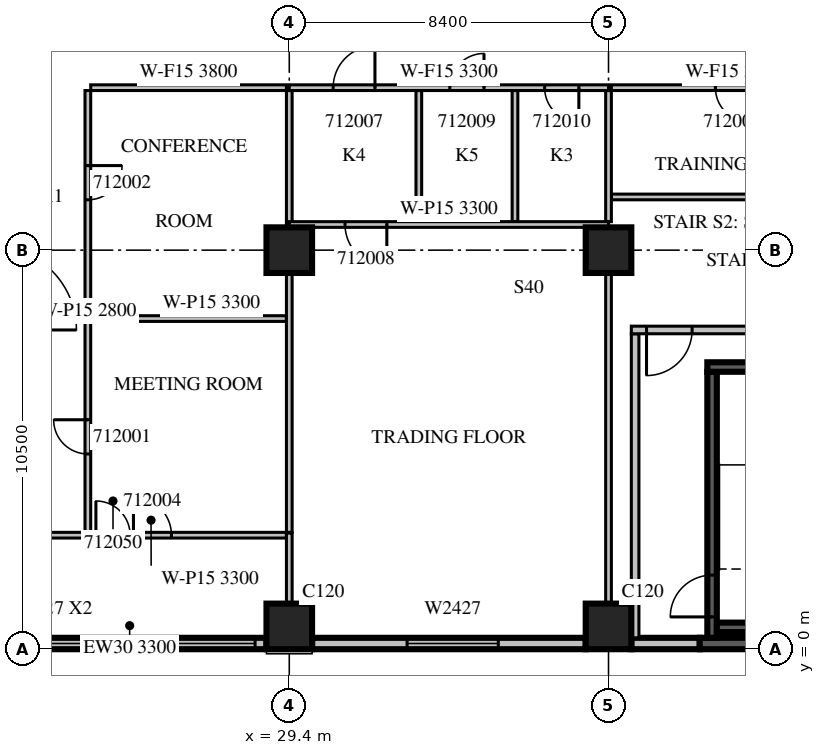
"""IFC4 building model, lengths in metres.
Left out: names, types, materials, properties, quantities, classifications, styles, units other than length and angle.
Written with IfcOpenShell. Run it as: python <this file> out.ifc"""

import sys

from ifc_helpers import new_model, si_unit, direction, frame, frame_2d, origin, origin_2d, place, context, subcontext, project, spatial, rectangle, extrude, source, transform, mapped, element, fill, save


model = new_model("IFC4")
c1 = context("Model", 3, precision=1e-05, world=origin(), true_north=direction((0.0, 1.0)))
c2 = subcontext(c1, "Body", "Model", "MODEL_VIEW")
j1 = project(units=[si_unit("LENGTHUNIT", "METRE"), si_unit("PLANEANGLEUNIT", "RADIAN")], contexts=[c1])
p1 = place(None, origin())
s1 = spatial("IfcSite", under=j1, at=p1, CompositionType="ELEMENT")
p2 = place(p1, origin())
s2 = spatial("IfcBuilding", under=s1, at=p2, CompositionType="ELEMENT")
p3 = place(p2, frame((0.0, 0.0, 61.5)))
s3 = spatial("IfcBuildingStorey", under=s2, at=p3, CompositionType="ELEMENT", Elevation=61.5)
m1 = source(origin(), c2, "Body", "SweptSolid", [
    extrude(rectangle(XDim=1.2, YDim=1.2, at=origin_2d()), origin(), (0.0, 0.0, 1.0), 4.2),
])
for number, where, z_axis, x_axis in (
    (1, (29.4, 0.6, 0.0), (0.0, 0.0, 1.0), (1.0, 0.0, 0.0)),
    (2, (37.8, 0.6, 0.0), (0.0, 0.0, 1.0), (1.0, 0.0, 0.0)),
    (3, (29.4, 10.5, 0.0), (0.0, 0.0, 1.0), (1.0, 0.0, 0.0)),
    (4, (37.8, 10.5, 0.0), (0.0, 0.0, 1.0), (1.0, 0.0, 0.0)),
):
    element("IfcColumn", number, at=place(p3, frame(where, z_axis=z_axis, x_axis=x_axis)), inside=s3, PredefinedType="COLUMN", context=c2, shape_type="MappedRepresentation", body=[
        mapped(m1, transform((0.0, 0.0, 0.0), scale=1.0)),
    ])
m2 = source(origin(), c2, "Body", "SweptSolid", [
    extrude(rectangle(XDim=7.2, YDim=0.3, at=frame_2d((3.6, 0.0))), origin(), (0.0, 0.0, 1.0), 3.3),
])
p4 = place(p3, frame((21.6, 0.15, 0.0), z_axis=(0.0, 0.0, 1.0), x_axis=(1.0, 0.0, 0.0)))
e5 = element("IfcWall", 5, at=p4, inside=s3, PredefinedType="STANDARD", context=c2, shape_type="MappedRepresentation", body=[
    mapped(m2, transform((0.0, 0.0, 0.0), scale=1.0)),
])
m3 = source(origin(), c2, "Body", "SweptSolid", [
    extrude(rectangle(XDim=2.4, YDim=2.7, at=frame_2d((1.2, 1.35))), frame((0.0, 0.16, 0.0), z_axis=(0.0, -1.0, 0.0), x_axis=(1.0, 0.0, 0.0)), (0.0, 0.0, 1.0), 0.32),
])
p5 = place(p4, frame((0.3, 0.0, 0.6)))
e6 = element("IfcOpeningElement", 6, at=p5, cuts=e5, PredefinedType="OPENING", context=c2, shape_type="MappedRepresentation", body=[
    mapped(m3, transform((0.0, 0.0, 0.0), scale=1.0)),
])
p6 = place(p4, frame((4.5, 0.0, 0.6)))
e7 = element("IfcOpeningElement", 7, at=p6, cuts=e5, PredefinedType="OPENING", context=c2, shape_type="MappedRepresentation", body=[
    mapped(m3, transform((0.0, 0.0, 0.0), scale=1.0)),
])
m4 = source(origin(), c2, "Body", "SweptSolid", [
    extrude(rectangle(XDim=7.2, YDim=0.3, at=frame_2d((3.6, 0.0))), origin(), (0.0, 0.0, 1.0), 3.8),
])
p7 = place(p3, frame((30.0, 0.15, 0.0), z_axis=(0.0, 0.0, 1.0), x_axis=(1.0, 0.0, 0.0)))
e8 = element("IfcWall", 8, at=p7, inside=s3, PredefinedType="STANDARD", context=c2, shape_type="MappedRepresentation", body=[
    mapped(m4, transform((0.0, 0.0, 0.0), scale=1.0)),
])
p8 = place(p7, frame((2.5, 0.0, 0.6)))
e9 = element("IfcOpeningElement", 9, at=p8, cuts=e8, PredefinedType="OPENING", context=c2, shape_type="MappedRepresentation", body=[
    mapped(m3, transform((0.0, 0.0, 0.0), scale=1.0)),
])
m5 = source(origin(), c2, "Body", "SweptSolid", [
    extrude(rectangle(XDim=1.8, YDim=0.3, at=frame_2d((0.9, 0.0))), origin(), (0.0, 0.0, 1.0), 3.8),
])
p9 = place(p3, frame((38.4, 0.15, 0.0), z_axis=(0.0, 0.0, 1.0), x_axis=(1.0, 0.0, 0.0)))
e10 = element("IfcWall", 10, at=p9, inside=s3, PredefinedType="STANDARD", context=c2, shape_type="MappedRepresentation", body=[
    mapped(m5, transform((0.0, 0.0, 0.0), scale=1.0)),
])
m6 = source(origin(), c2, "Body", "SweptSolid", [
    extrude(rectangle(XDim=3.8, YDim=0.3, at=frame_2d((1.9, 0.0))), origin(), (0.0, 0.0, 1.0), 3.8),
])
p10 = place(p3, frame((40.2, 0.15, 0.0), z_axis=(0.0, 0.0, 1.0), x_axis=(1.0, 0.0, 0.0)))
e11 = element("IfcWall", 11, at=p10, inside=s3, PredefinedType="SOLIDWALL", context=c2, shape_type="MappedRepresentation", body=[
    mapped(m6, transform((0.0, 0.0, 0.0), scale=1.0)),
])
m7 = source(origin(), c2, "Body", "SweptSolid", [
    extrude(rectangle(XDim=7.0, YDim=0.25, at=frame_2d((3.5, 0.0))), origin(), (0.0, 0.0, 1.0), 3.8),
])
p11 = place(p3, frame((40.525, 0.3, 0.0), z_axis=(0.0, 0.0, 1.0), x_axis=(0.0, 1.0, 0.0)))
e12 = element("IfcWall", 12, at=p11, inside=s3, PredefinedType="SOLIDWALL", context=c2, shape_type="MappedRepresentation", body=[
    mapped(m7, transform((0.0, 0.0, 0.0), scale=1.0)),
])
m8 = source(origin(), c2, "Body", "SweptSolid", [
    extrude(rectangle(XDim=1.1, YDim=2.1, at=frame_2d((0.55, 1.05))), frame((0.0, 0.135, 0.0), z_axis=(0.0, -1.0, 0.0), x_axis=(1.0, 0.0, 0.0)), (0.0, 0.0, 1.0), 0.27),
])
p12 = place(p11, frame((0.55, 0.0, 0.0)))
e13 = element("IfcOpeningElement", 13, at=p12, cuts=e12, PredefinedType="OPENING", context=c2, shape_type="MappedRepresentation", body=[
    mapped(m8, transform((0.0, 0.0, 0.0), scale=1.0)),
])
m9 = source(origin(), c2, "Body", "SweptSolid", [
    extrude(rectangle(XDim=3.45, YDim=0.25, at=frame_2d((1.725, 0.0))), origin(), (0.0, 0.0, 1.0), 3.8),
])
p13 = place(p3, frame((40.4, 7.425, 0.0), z_axis=(0.0, 0.0, 1.0), x_axis=(1.0, 0.0, 0.0)))
e14 = element("IfcWall", 14, at=p13, inside=s3, PredefinedType="SOLIDWALL", context=c2, shape_type="MappedRepresentation", body=[
    mapped(m9, transform((0.0, 0.0, 0.0), scale=1.0)),
])
m10 = source(origin(), c2, "Body", "SweptSolid", [
    extrude(rectangle(XDim=2.95, YDim=0.25, at=frame_2d((1.475, 0.0))), origin(), (0.0, 0.0, 1.0), 3.8),
])
p14 = place(p3, frame((40.65, 0.575, 0.0), z_axis=(0.0, 0.0, 1.0), x_axis=(1.0, 0.0, 0.0)))
e15 = element("IfcWall", 15, at=p14, inside=s3, PredefinedType="SOLIDWALL", context=c2, shape_type="MappedRepresentation", body=[
    mapped(m10, transform((0.0, 0.0, 0.0), scale=1.0)),
])
m11 = source(origin(), c2, "Body", "SweptSolid", [
    extrude(rectangle(XDim=8.0, YDim=0.2, at=frame_2d((4.0, 0.0))), origin(), (0.0, 0.0, 1.0), 3.8),
])
p15 = place(p3, frame((38.5, 0.3, 0.0), z_axis=(0.0, 0.0, 1.0), x_axis=(0.0, 1.0, 0.0)))
e16 = element("IfcWall", 16, at=p15, inside=s3, PredefinedType="PARTITIONING", context=c2, shape_type="MappedRepresentation", body=[
    mapped(m11, transform((0.0, 0.0, 0.0), scale=1.0)),
])
m12 = source(origin(), c2, "Body", "SweptSolid", [
    extrude(rectangle(XDim=5.45, YDim=0.2, at=frame_2d((2.725, 0.0))), origin(), (0.0, 0.0, 1.0), 3.8),
])
p16 = place(p3, frame((38.4, 8.4, 0.0), z_axis=(0.0, 0.0, 1.0), x_axis=(1.0, 0.0, 0.0)))
e17 = element("IfcWall", 17, at=p16, inside=s3, PredefinedType="PARTITIONING", context=c2, shape_type="MappedRepresentation", body=[
    mapped(m12, transform((0.0, 0.0, 0.0), scale=1.0)),
])
m13 = source(origin(), c2, "Body", "SweptSolid", [
    extrude(rectangle(XDim=1.2, YDim=2.1, at=frame_2d((0.6, 1.05))), frame((0.0, 0.11, 0.0), z_axis=(0.0, -1.0, 0.0), x_axis=(1.0, 0.0, 0.0)), (0.0, 0.0, 1.0), 0.22),
])
p17 = place(p16, frame((0.4, 0.0, 0.0)))
e18 = element("IfcOpeningElement", 18, at=p17, cuts=e17, PredefinedType="OPENING", context=c2, shape_type="MappedRepresentation", body=[
    mapped(m13, transform((0.0, 0.0, 0.0), scale=1.0)),
])
m14 = source(origin(), c2, "Body", "SweptSolid", [
    extrude(rectangle(XDim=0.9, YDim=2.1, at=frame_2d((0.45, 1.05))), frame((0.0, 0.11, 0.0), z_axis=(0.0, -1.0, 0.0), x_axis=(1.0, 0.0, 0.0)), (0.0, 0.0, 1.0), 0.22),
])
p18 = place(p16, frame((3.25, 0.0, 0.0)))
e19 = element("IfcOpeningElement", 19, at=p18, cuts=e17, PredefinedType="OPENING", context=c2, shape_type="MappedRepresentation", body=[
    mapped(m14, transform((0.0, 0.0, 0.0), scale=1.0)),
])
m15 = source(origin(), c2, "Body", "SweptSolid", [
    extrude(rectangle(XDim=11.625, YDim=0.15, at=frame_2d((5.812, 0.0))), origin(), (0.0, 0.0, 1.0), 2.8),
])
p19 = place(p3, frame((24.1, 14.7, 0.0), z_axis=(0.0, 0.0, 1.0), x_axis=(0.0, -1.0, 0.0)))
e20 = element("IfcWall", 20, at=p19, inside=s3, PredefinedType="PARTITIONING", context=c2, shape_type="MappedRepresentation", body=[
    mapped(m15, transform((0.0, 0.0, 0.0), scale=1.0)),
])
m16 = source(origin(), c2, "Body", "SweptSolid", [
    extrude(rectangle(XDim=0.9, YDim=2.1, at=frame_2d((0.45, 1.05))), frame((0.0, 0.085, 0.0), z_axis=(0.0, -1.0, 0.0), x_axis=(1.0, 0.0, 0.0)), (0.0, 0.0, 1.0), 0.17),
])
p20 = place(p19, frame((8.662, 0.0, 0.0)))
e21 = element("IfcOpeningElement", 21, at=p20, cuts=e20, PredefinedType="OPENING", context=c2, shape_type="MappedRepresentation", body=[
    mapped(m16, transform((0.0, 0.0, 0.0), scale=1.0)),
])
p21 = place(p19, frame((1.975, 0.0, 0.0)))
e22 = element("IfcOpeningElement", 22, at=p21, cuts=e20, PredefinedType="OPENING", context=c2, shape_type="MappedRepresentation", body=[
    mapped(m16, transform((0.0, 0.0, 0.0), scale=1.0)),
])
m17 = source(origin(), c2, "Body", "SweptSolid", [
    extrude(rectangle(XDim=5.15, YDim=0.15, at=frame_2d((2.575, 0.0))), origin(), (0.0, 0.0, 1.0), 3.3),
])
p22 = place(p3, frame((29.325, 8.7, 0.0), z_axis=(0.0, 0.0, 1.0), x_axis=(-1.0, 0.0, 0.0)))
e23 = element("IfcWall", 23, at=p22, inside=s3, PredefinedType="PARTITIONING", context=c2, shape_type="MappedRepresentation", body=[
    mapped(m17, transform((0.0, 0.0, 0.0), scale=1.0)),
])
m18 = source(origin(), c2, "Body", "SweptSolid", [
    extrude(rectangle(XDim=5.15, YDim=0.15, at=frame_2d((2.575, 0.0))), origin(), (0.0, 0.0, 1.0), 3.8),
])
p23 = place(p3, frame((29.325, 14.775, 0.0), z_axis=(0.0, 0.0, 1.0), x_axis=(-1.0, 0.0, 0.0)))
e24 = element("IfcWall", 24, at=p23, inside=s3, PredefinedType="PARTITIONING", context=c2, shape_type="MappedRepresentation", body=[
    mapped(m18, transform((0.0, 0.0, 0.0), scale=1.0)),
])
m19 = source(origin(), c2, "Body", "SweptSolid", [
    extrude(rectangle(XDim=6.826, YDim=0.15, at=frame_2d((3.413, 0.0))), origin(), (0.0, 0.0, 1.0), 3.8),
])
p24 = place(p3, frame((29.4, 3.075, 0.0), z_axis=(0.0, 0.0, 1.0), x_axis=(0.0, 1.0, 0.0)))
e25 = element("IfcWall", 25, at=p24, inside=s3, PredefinedType="PARTITIONING", context=c2, shape_type="MappedRepresentation", body=[
    mapped(m19, transform((0.0, 0.0, 0.0), scale=1.0)),
])
m20 = source(origin(), c2, "Body", "SweptSolid", [
    extrude(rectangle(XDim=3.601, YDim=0.15, at=frame_2d((1.8, 0.0))), origin(), (0.0, 0.0, 1.0), 3.8),
])
p25 = place(p3, frame((29.4, 11.099, 0.0), z_axis=(0.0, 0.0, 1.0), x_axis=(0.0, 1.0, 0.0)))
e26 = element("IfcWall", 26, at=p25, inside=s3, PredefinedType="PARTITIONING", context=c2, shape_type="MappedRepresentation", body=[
    mapped(m20, transform((0.0, 0.0, 0.0), scale=1.0)),
])
m21 = source(origin(), c2, "Body", "SweptSolid", [
    extrude(rectangle(XDim=7.125, YDim=0.15, at=frame_2d((3.562, 0.0))), origin(), (0.0, 0.0, 1.0), 3.3),
])
p26 = place(p3, frame((22.2, 3.0, 0.0), z_axis=(0.0, 0.0, 1.0), x_axis=(1.0, 0.0, 0.0)))
e27 = element("IfcWall", 27, at=p26, inside=s3, PredefinedType="PARTITIONING", context=c2, shape_type="MappedRepresentation", body=[
    mapped(m21, transform((0.0, 0.0, 0.0), scale=1.0)),
])
m22 = source(origin(), c2, "Body", "SweptSolid", [
    extrude(rectangle(XDim=1.0, YDim=2.1, at=frame_2d((0.5, 1.05))), frame((0.0, 0.085, 0.0), z_axis=(0.0, -1.0, 0.0), x_axis=(1.0, 0.0, 0.0)), (0.0, 0.0, 1.0), 0.17),
])
p27 = place(p26, frame((3.1, 0.0, 0.0)))
e28 = element("IfcOpeningElement", 28, at=p27, cuts=e27, PredefinedType="OPENING", context=c2, shape_type="MappedRepresentation", body=[
    mapped(m22, transform((0.0, 0.0, 0.0), scale=1.0)),
])
p28 = place(p26, frame((2.112, 0.0, 0.0)))
e29 = element("IfcOpeningElement", 29, at=p28, cuts=e27, PredefinedType="OPENING", context=c2, shape_type="MappedRepresentation", body=[
    mapped(m16, transform((0.0, 0.0, 0.0), scale=1.0)),
])
m23 = source(origin(), c2, "Body", "SweptSolid", [
    extrude(rectangle(XDim=6.45, YDim=0.15, at=frame_2d((3.225, 0.0))), origin(), (0.0, 0.0, 1.0), 3.8),
])
p29 = place(p3, frame((37.875, 11.9, 0.0), z_axis=(0.0, 0.0, 1.0), x_axis=(1.0, 0.0, 0.0)))
e30 = element("IfcWall", 30, at=p29, inside=s3, PredefinedType="PARTITIONING", context=c2, shape_type="MappedRepresentation", body=[
    mapped(m23, transform((0.0, 0.0, 0.0), scale=1.0)),
])
p30 = place(p3, frame((44.325, 14.775, 0.0), z_axis=(0.0, 0.0, 1.0), x_axis=(-1.0, 0.0, 0.0)))
e31 = element("IfcWall", 31, at=p30, inside=s3, PredefinedType="PARTITIONING", context=c2, shape_type="MappedRepresentation", body=[
    mapped(m23, transform((0.0, 0.0, 0.0), scale=1.0)),
])
p31 = place(p30, frame((2.812, 0.0, 0.0)))
e32 = element("IfcOpeningElement", 32, at=p31, cuts=e31, PredefinedType="OPENING", context=c2, shape_type="MappedRepresentation", body=[
    mapped(m16, transform((0.0, 0.0, 0.0), scale=1.0)),
])
m24 = source(origin(), c2, "Body", "SweptSolid", [
    extrude(rectangle(XDim=3.45, YDim=0.15, at=frame_2d((1.725, 0.0))), origin(), (0.0, 0.0, 1.0), 3.8),
])
for number, where, z_axis, x_axis in (
    (33, (32.809, 11.25, 0.0), (0.0, 0.0, 1.0), (0.0, 1.0, 0.0)),
    (34, (35.339, 11.25, 0.0), (0.0, 0.0, 1.0), (0.0, 1.0, 0.0)),
):
    element("IfcWall", number, at=place(p3, frame(where, z_axis=z_axis, x_axis=x_axis)), inside=s3, PredefinedType="PARTITIONING", context=c2, shape_type="MappedRepresentation", body=[
        mapped(m24, transform((0.0, 0.0, 0.0), scale=1.0)),
    ])
m25 = source(origin(), c2, "Body", "SweptSolid", [
    extrude(rectangle(XDim=1.856, YDim=0.15, at=frame_2d((0.928, 0.0))), origin(), (0.0, 0.0, 1.0), 3.8),
])
p32 = place(p3, frame((29.4, 1.199, 0.0), z_axis=(0.0, 0.0, 1.0), x_axis=(0.0, 1.0, 0.0)))
e35 = element("IfcWall", 35, at=p32, inside=s3, PredefinedType="PARTITIONING", context=c2, shape_type="MappedRepresentation", body=[
    mapped(m25, transform((0.0, 0.0, 0.0), scale=1.0)),
])
m26 = source(origin(), c2, "Body", "SweptSolid", [
    extrude(rectangle(XDim=8.702, YDim=0.15, at=frame_2d((4.351, 0.0))), origin(), (0.0, 0.0, 1.0), 3.8),
])
p33 = place(p3, frame((37.8, 1.199, 0.0), z_axis=(0.0, 0.0, 1.0), x_axis=(0.0, 1.0, 0.0)))
e36 = element("IfcWall", 36, at=p33, inside=s3, PredefinedType="PARTITIONING", context=c2, shape_type="MappedRepresentation", body=[
    mapped(m26, transform((0.0, 0.0, 0.0), scale=1.0)),
])
p34 = place(p3, frame((37.8, 11.25, 0.0), z_axis=(0.0, 0.0, 1.0), x_axis=(0.0, 1.0, 0.0)))
e37 = element("IfcWall", 37, at=p34, inside=s3, PredefinedType="PARTITIONING", context=c2, shape_type="MappedRepresentation", body=[
    mapped(m24, transform((0.0, 0.0, 0.0), scale=1.0)),
])
m27 = source(origin(), c2, "Body", "SweptSolid", [
    extrude(rectangle(XDim=8.4, YDim=0.15, at=frame_2d((4.2, 0.0))), origin(), (0.0, 0.0, 1.0), 3.3),
])
p35 = place(p3, frame((37.8, 11.175, 0.0), z_axis=(0.0, 0.0, 1.0), x_axis=(-1.0, 0.0, 0.0)))
e38 = element("IfcWall", 38, at=p35, inside=s3, PredefinedType="PARTITIONING", context=c2, shape_type="MappedRepresentation", body=[
    mapped(m27, transform((0.0, 0.0, 0.0), scale=1.0)),
])
m28 = source(origin(), c2, "Body", "SweptSolid", [
    extrude(rectangle(XDim=1.1, YDim=2.1, at=frame_2d((0.55, 1.05))), frame((0.0, 0.085, 0.0), z_axis=(0.0, -1.0, 0.0), x_axis=(1.0, 0.0, 0.0)), (0.0, 0.0, 1.0), 0.17),
])
p36 = place(p35, frame((5.833, 0.0, 0.0)))
e39 = element("IfcOpeningElement", 39, at=p36, cuts=e38, PredefinedType="OPENING", context=c2, shape_type="MappedRepresentation", body=[
    mapped(m28, transform((0.0, 0.0, 0.0), scale=1.0)),
])
p37 = place(p3, frame((37.8, 14.775, 0.0), z_axis=(0.0, 0.0, 1.0), x_axis=(-1.0, 0.0, 0.0)))
e40 = element("IfcWall", 40, at=p37, inside=s3, PredefinedType="PARTITIONING", context=c2, shape_type="MappedRepresentation", body=[
    mapped(m27, transform((0.0, 0.0, 0.0), scale=1.0)),
])
p38 = place(p37, frame((6.146, 0.0, 0.0)))
e41 = element("IfcOpeningElement", 41, at=p38, cuts=e40, PredefinedType="OPENING", context=c2, shape_type="MappedRepresentation", body=[
    mapped(m28, transform((0.0, 0.0, 0.0), scale=1.0)),
])
p39 = place(p37, frame((3.276, 0.0, 0.0)))
e42 = element("IfcOpeningElement", 42, at=p39, cuts=e40, PredefinedType="OPENING", context=c2, shape_type="MappedRepresentation", body=[
    mapped(m16, transform((0.0, 0.0, 0.0), scale=1.0)),
])
p40 = place(p37, frame((0.781, 0.0, 0.0)))
e43 = element("IfcOpeningElement", 43, at=p40, cuts=e40, PredefinedType="OPENING", context=c2, shape_type="MappedRepresentation", body=[
    mapped(m16, transform((0.0, 0.0, 0.0), scale=1.0)),
])
m29 = source(origin(), c2, "Body", "SweptSolid", [
    extrude(rectangle(XDim=2.4, YDim=2.7, at=frame_2d((1.2, 1.35))), frame((0.0, 0.03, 0.0), z_axis=(0.0, -1.0, 0.0), x_axis=(1.0, 0.0, 0.0)), (0.0, 0.0, 1.0), 0.06),
])
p41 = place(p5, origin())
e44 = element("IfcWindow", 44, at=p41, inside=s3, PartitioningType="SINGLE_PANEL", PredefinedType="WINDOW", context=c2, shape_type="MappedRepresentation", body=[
    mapped(m29, transform((0.0, 0.0, 0.0), scale=1.0)),
])
fill(e6, e44)
p42 = place(p6, origin())
e45 = element("IfcWindow", 45, at=p42, inside=s3, PartitioningType="SINGLE_PANEL", PredefinedType="WINDOW", context=c2, shape_type="MappedRepresentation", body=[
    mapped(m29, transform((0.0, 0.0, 0.0), scale=1.0)),
])
fill(e7, e45)
p43 = place(p8, origin())
e46 = element("IfcWindow", 46, at=p43, inside=s3, PartitioningType="SINGLE_PANEL", PredefinedType="WINDOW", context=c2, shape_type="MappedRepresentation", body=[
    mapped(m29, transform((0.0, 0.0, 0.0), scale=1.0)),
])
fill(e9, e46)
m30 = source(origin(), c2, "Body", "SweptSolid", [
    extrude(rectangle(XDim=1.1, YDim=2.1, at=frame_2d((0.55, 1.05))), frame((0.0, 0.025, 0.0), z_axis=(0.0, -1.0, 0.0), x_axis=(1.0, 0.0, 0.0)), (0.0, 0.0, 1.0), 0.05),
])
p44 = place(p12, origin())
e47 = element("IfcDoor", 47, at=p44, inside=s3, OperationType="SINGLE_SWING_LEFT", PredefinedType="DOOR", context=c2, shape_type="MappedRepresentation", body=[
    mapped(m30, transform((0.0, 0.0, 0.0), scale=1.0)),
])
fill(e13, e47)
m31 = source(origin(), c2, "Body", "SweptSolid", [
    extrude(rectangle(XDim=1.2, YDim=2.1, at=frame_2d((0.6, 1.05))), frame((0.0, 0.025, 0.0), z_axis=(0.0, -1.0, 0.0), x_axis=(1.0, 0.0, 0.0)), (0.0, 0.0, 1.0), 0.05),
])
p45 = place(p17, origin())
e48 = element("IfcDoor", 48, at=p45, inside=s3, OperationType="SINGLE_SWING_RIGHT", PredefinedType="DOOR", context=c2, shape_type="MappedRepresentation", body=[
    mapped(m31, transform((0.0, 0.0, 0.0), scale=1.0)),
])
fill(e18, e48)
m32 = source(origin(), c2, "Body", "SweptSolid", [
    extrude(rectangle(XDim=0.9, YDim=2.1, at=frame_2d((0.45, 1.05))), frame((0.0, 0.025, 0.0), z_axis=(0.0, -1.0, 0.0), x_axis=(1.0, 0.0, 0.0)), (0.0, 0.0, 1.0), 0.05),
])
p46 = place(p20, origin())
e49 = element("IfcDoor", 49, at=p46, inside=s3, OperationType="SINGLE_SWING_RIGHT", PredefinedType="DOOR", context=c2, shape_type="MappedRepresentation", body=[
    mapped(m32, transform((0.0, 0.0, 0.0), scale=1.0)),
])
fill(e21, e49)
p47 = place(p21, origin())
e50 = element("IfcDoor", 50, at=p47, inside=s3, OperationType="SINGLE_SWING_LEFT", PredefinedType="DOOR", context=c2, shape_type="MappedRepresentation", body=[
    mapped(m32, transform((0.0, 0.0, 0.0), scale=1.0)),
])
fill(e22, e50)
m33 = source(origin(), c2, "Body", "SweptSolid", [
    extrude(rectangle(XDim=1.0, YDim=2.1, at=frame_2d((0.5, 1.05))), frame((0.0, 0.025, 0.0), z_axis=(0.0, -1.0, 0.0), x_axis=(1.0, 0.0, 0.0)), (0.0, 0.0, 1.0), 0.05),
])
p48 = place(p27, origin())
e51 = element("IfcDoor", 51, at=p48, inside=s3, OperationType="SINGLE_SWING_LEFT", PredefinedType="DOOR", context=c2, shape_type="MappedRepresentation", body=[
    mapped(m33, transform((0.0, 0.0, 0.0), scale=1.0)),
])
fill(e28, e51)
p49 = place(p31, origin())
e52 = element("IfcDoor", 52, at=p49, inside=s3, OperationType="SINGLE_SWING_LEFT", PredefinedType="DOOR", context=c2, shape_type="MappedRepresentation", body=[
    mapped(m32, transform((0.0, 0.0, 0.0), scale=1.0)),
])
fill(e32, e52)
p50 = place(p38, origin())
e53 = element("IfcDoor", 53, at=p50, inside=s3, OperationType="SINGLE_SWING_RIGHT", PredefinedType="DOOR", context=c2, shape_type="MappedRepresentation", body=[
    mapped(m30, transform((0.0, 0.0, 0.0), scale=1.0)),
])
fill(e41, e53)
p51 = place(p36, origin())
e54 = element("IfcDoor", 54, at=p51, inside=s3, OperationType="SINGLE_SWING_LEFT", PredefinedType="DOOR", context=c2, shape_type="MappedRepresentation", body=[
    mapped(m30, transform((0.0, 0.0, 0.0), scale=1.0)),
])
fill(e39, e54)
p52 = place(p39, origin())
e55 = element("IfcDoor", 55, at=p52, inside=s3, OperationType="SINGLE_SWING_RIGHT", PredefinedType="DOOR", context=c2, shape_type="MappedRepresentation", body=[
    mapped(m32, transform((0.0, 0.0, 0.0), scale=1.0)),
])
fill(e42, e55)
p53 = place(p40, origin())
e56 = element("IfcDoor", 56, at=p53, inside=s3, OperationType="SINGLE_SWING_LEFT", PredefinedType="DOOR", context=c2, shape_type="MappedRepresentation", body=[
    mapped(m32, transform((0.0, 0.0, 0.0), scale=1.0)),
])
fill(e43, e56)
p54 = place(p28, origin())
e57 = element("IfcDoor", 57, at=p54, inside=s3, OperationType="SINGLE_SWING_LEFT", PredefinedType="DOOR", context=c2, shape_type="MappedRepresentation", body=[
    mapped(m32, transform((0.0, 0.0, 0.0), scale=1.0)),
])
fill(e29, e57)
save(model, sys.argv[1])
